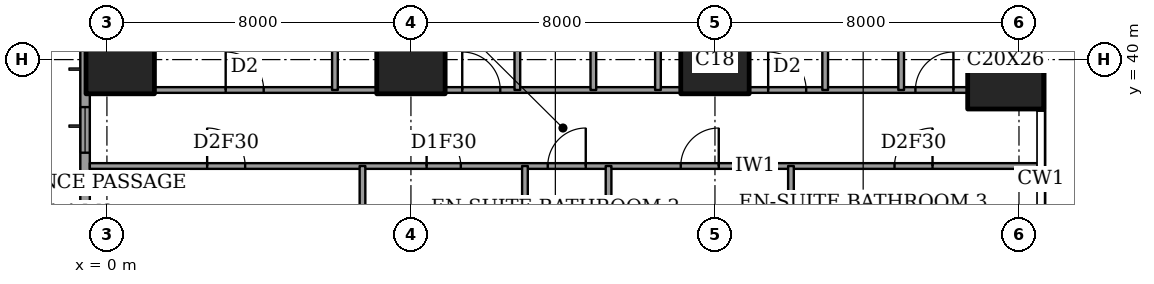
"""IFC4 building model, lengths in metres.
Left out: names, types, materials, properties, quantities, classifications, styles, units other than length and angle.
Written with IfcOpenShell. Run it as: python <this file> out.ifc"""

import sys

from ifc_helpers import new_model, si_unit, direction, frame, frame_2d, origin, origin_2d, place, context, subcontext, project, spatial, rectangle, extrude, element, fill, save


model = new_model("IFC4")
c1 = context("Model", 3, precision=1e-05, world=origin(), true_north=direction((0.0, 1.0)))
c2 = subcontext(c1, "Body", "Model", "MODEL_VIEW")
j1 = project(units=[si_unit("LENGTHUNIT", "METRE"), si_unit("PLANEANGLEUNIT", "RADIAN")], contexts=[c1])
p1 = place(None, origin())
s1 = spatial("IfcSite", under=j1, at=p1, CompositionType="ELEMENT")
p2 = place(p1, origin())
s2 = spatial("IfcBuilding", under=s1, at=p2, CompositionType="ELEMENT")
p3 = place(p2, frame((0.0, 0.0, 207.4)))
s3 = spatial("IfcBuildingStorey", under=s2, at=p3, CompositionType="ELEMENT", Elevation=207.4)
for number, where, z_axis, x_axis in (
    (1, (0.35, 40.0, 0.0), (0.0, 0.0, 1.0), (1.0, 0.0, 0.0)),
    (2, (8.0, 40.0, 0.0), (0.0, 0.0, 1.0), (1.0, 0.0, 0.0)),
    (3, (16.0, 40.0, 0.0), (0.0, 0.0, 1.0), (1.0, 0.0, 0.0)),
):
    element("IfcColumn", number, at=place(p3, frame(where, z_axis=z_axis, x_axis=x_axis)), inside=s3, PredefinedType="COLUMN", context=c2, shape_type="SweptSolid", body=[
        extrude(rectangle(XDim=1.8, YDim=1.8, at=origin_2d()), origin(), (0.0, 0.0, 1.0), 3.6),
    ])
p4 = place(p3, frame((23.65, 40.0, 0.0), z_axis=(0.0, 0.0, 1.0), x_axis=(1.0, 0.0, 0.0)))
e4 = element("IfcColumn", 4, at=p4, inside=s3, PredefinedType="COLUMN", context=c2, shape_type="SweptSolid", body=[
    extrude(rectangle(XDim=2.0, YDim=2.6, at=origin_2d()), origin(), (0.0, 0.0, 1.0), 3.6),
])
p5 = place(p3, frame((-0.575, 44.825, 0.0), z_axis=(0.0, 0.0, 1.0), x_axis=(0.0, -1.0, 0.0)))
e5 = element("IfcWall", 5, at=p5, inside=s3, PredefinedType="SOLIDWALL", context=c2, shape_type="SweptSolid", body=[
    extrude(rectangle(XDim=41.65, YDim=0.25, at=frame_2d((20.825, 0.0))), origin(), (0.0, 0.0, 1.0), 3.6),
])
p6 = place(p5, frame((0.825, 0.0, 0.2)))
e6 = element("IfcOpeningElement", 6, at=p6, cuts=e5, PredefinedType="OPENING", context=c2, shape_type="SweptSolid", body=[
    extrude(rectangle(XDim=2.4, YDim=2.4, at=frame_2d((1.2, 1.2))), frame((0.0, 0.135, 0.0), z_axis=(0.0, -1.0, 0.0), x_axis=(1.0, 0.0, 0.0)), (0.0, 0.0, 1.0), 0.27),
])
p7 = place(p5, frame((6.075, 0.0, 0.2)))
e7 = element("IfcOpeningElement", 7, at=p7, cuts=e5, PredefinedType="OPENING", context=c2, shape_type="SweptSolid", body=[
    extrude(rectangle(XDim=1.2, YDim=2.4, at=frame_2d((0.6, 1.2))), frame((0.0, 0.135, 0.0), z_axis=(0.0, -1.0, 0.0), x_axis=(1.0, 0.0, 0.0)), (0.0, 0.0, 1.0), 0.27),
])
p8 = place(p5, frame((8.575, 0.0, 0.2)))
e8 = element("IfcOpeningElement", 8, at=p8, cuts=e5, PredefinedType="OPENING", context=c2, shape_type="SweptSolid", body=[
    extrude(rectangle(XDim=2.4, YDim=2.4, at=frame_2d((1.2, 1.2))), frame((0.0, 0.135, 0.0), z_axis=(0.0, -1.0, 0.0), x_axis=(1.0, 0.0, 0.0)), (0.0, 0.0, 1.0), 0.27),
])
p9 = place(p5, frame((15.675, 0.0, 0.2)))
e9 = element("IfcOpeningElement", 9, at=p9, cuts=e5, PredefinedType="OPENING", context=c2, shape_type="SweptSolid", body=[
    extrude(rectangle(XDim=2.4, YDim=2.4, at=frame_2d((1.2, 1.2))), frame((0.0, 0.135, 0.0), z_axis=(0.0, -1.0, 0.0), x_axis=(1.0, 0.0, 0.0)), (0.0, 0.0, 1.0), 0.27),
])
p10 = place(p5, frame((23.575, 0.0, 0.2)))
e10 = element("IfcOpeningElement", 10, at=p10, cuts=e5, PredefinedType="OPENING", context=c2, shape_type="SweptSolid", body=[
    extrude(rectangle(XDim=2.4, YDim=2.4, at=frame_2d((1.2, 1.2))), frame((0.0, 0.135, 0.0), z_axis=(0.0, -1.0, 0.0), x_axis=(1.0, 0.0, 0.0)), (0.0, 0.0, 1.0), 0.27),
])
p11 = place(p5, frame((30.775, 0.0, 0.2)))
e11 = element("IfcOpeningElement", 11, at=p11, cuts=e5, PredefinedType="OPENING", context=c2, shape_type="SweptSolid", body=[
    extrude(rectangle(XDim=2.4, YDim=2.4, at=frame_2d((1.2, 1.2))), frame((0.0, 0.135, 0.0), z_axis=(0.0, -1.0, 0.0), x_axis=(1.0, 0.0, 0.0)), (0.0, 0.0, 1.0), 0.27),
])
p12 = place(p5, frame((34.55, 0.0, 0.2)))
e12 = element("IfcOpeningElement", 12, at=p12, cuts=e5, PredefinedType="OPENING", context=c2, shape_type="SweptSolid", body=[
    extrude(rectangle(XDim=1.2, YDim=2.4, at=frame_2d((0.6, 1.2))), frame((0.0, 0.135, 0.0), z_axis=(0.0, -1.0, 0.0), x_axis=(1.0, 0.0, 0.0)), (0.0, 0.0, 1.0), 0.27),
])
p13 = place(p5, frame((38.425, 0.0, 0.2)))
e13 = element("IfcOpeningElement", 13, at=p13, cuts=e5, PredefinedType="OPENING", context=c2, shape_type="SweptSolid", body=[
    extrude(rectangle(XDim=2.4, YDim=2.4, at=frame_2d((1.2, 1.2))), frame((0.0, 0.135, 0.0), z_axis=(0.0, -1.0, 0.0), x_axis=(1.0, 0.0, 0.0)), (0.0, 0.0, 1.0), 0.27),
])
p14 = place(p3, frame((-0.45, 37.2, 0.0), z_axis=(0.0, 0.0, 1.0), x_axis=(1.0, 0.0, 0.0)))
e14 = element("IfcWall", 14, at=p14, inside=s3, PredefinedType="PARTITIONING", context=c2, shape_type="SweptSolid", body=[
    extrude(rectangle(XDim=25.011, YDim=0.15, at=frame_2d((12.505, 0.0))), origin(), (0.0, 0.0, 1.0), 3.35),
])
p15 = place(p14, frame((12.05, 0.0, 0.0)))
e15 = element("IfcOpeningElement", 15, at=p15, cuts=e14, PredefinedType="OPENING", context=c2, shape_type="SweptSolid", body=[
    extrude(rectangle(XDim=1.0, YDim=2.1, at=frame_2d((0.5, 1.05))), frame((0.0, 0.085, 0.0), z_axis=(0.0, -1.0, 0.0), x_axis=(1.0, 0.0, 0.0)), (0.0, 0.0, 1.0), 0.17),
])
p16 = place(p14, frame((3.087, 0.0, 0.0)))
e16 = element("IfcOpeningElement", 16, at=p16, cuts=e14, PredefinedType="OPENING", context=c2, shape_type="SweptSolid", body=[
    extrude(rectangle(XDim=1.0, YDim=2.1, at=frame_2d((0.5, 1.05))), frame((0.0, 0.085, 0.0), z_axis=(0.0, -1.0, 0.0), x_axis=(1.0, 0.0, 0.0)), (0.0, 0.0, 1.0), 0.17),
])
p17 = place(p14, frame((8.863, 0.0, 0.0)))
e17 = element("IfcOpeningElement", 17, at=p17, cuts=e14, PredefinedType="OPENING", context=c2, shape_type="SweptSolid", body=[
    extrude(rectangle(XDim=0.9, YDim=2.1, at=frame_2d((0.45, 1.05))), frame((0.0, 0.085, 0.0), z_axis=(0.0, -1.0, 0.0), x_axis=(1.0, 0.0, 0.0)), (0.0, 0.0, 1.0), 0.17),
])
p18 = place(p14, frame((15.55, 0.0, 0.0)))
e18 = element("IfcOpeningElement", 18, at=p18, cuts=e14, PredefinedType="OPENING", context=c2, shape_type="SweptSolid", body=[
    extrude(rectangle(XDim=1.0, YDim=2.1, at=frame_2d((0.5, 1.05))), frame((0.0, 0.085, 0.0), z_axis=(0.0, -1.0, 0.0), x_axis=(1.0, 0.0, 0.0)), (0.0, 0.0, 1.0), 0.17),
])
p19 = place(p14, frame((21.175, 0.0, 0.0)))
e19 = element("IfcOpeningElement", 19, at=p19, cuts=e14, PredefinedType="OPENING", context=c2, shape_type="SweptSolid", body=[
    extrude(rectangle(XDim=1.0, YDim=2.1, at=frame_2d((0.5, 1.05))), frame((0.0, 0.085, 0.0), z_axis=(0.0, -1.0, 0.0), x_axis=(1.0, 0.0, 0.0)), (0.0, 0.0, 1.0), 0.17),
])
p20 = place(p3, frame((1.25, 39.2, 0.0), z_axis=(0.0, 0.0, 1.0), x_axis=(1.0, 0.0, 0.0)))
e20 = element("IfcWall", 20, at=p20, inside=s3, PredefinedType="PARTITIONING", context=c2, shape_type="SweptSolid", body=[
    extrude(rectangle(XDim=5.85, YDim=0.15, at=frame_2d((2.925, 0.0))), origin(), (0.0, 0.0, 1.0), 3.35),
])
p21 = place(p20, frame((1.875, 0.0, 0.0)))
e21 = element("IfcOpeningElement", 21, at=p21, cuts=e20, PredefinedType="OPENING", context=c2, shape_type="SweptSolid", body=[
    extrude(rectangle(XDim=1.0, YDim=2.1, at=frame_2d((0.5, 1.05))), frame((0.0, 0.085, 0.0), z_axis=(0.0, -1.0, 0.0), x_axis=(1.0, 0.0, 0.0)), (0.0, 0.0, 1.0), 0.17),
])
p22 = place(p3, frame((8.9, 39.2, 0.0), z_axis=(0.0, 0.0, 1.0), x_axis=(1.0, 0.0, 0.0)))
e22 = element("IfcWall", 22, at=p22, inside=s3, PredefinedType="PARTITIONING", context=c2, shape_type="SweptSolid", body=[
    extrude(rectangle(XDim=6.2, YDim=0.15, at=frame_2d((3.1, 0.0))), origin(), (0.0, 0.0, 1.0), 3.35),
])
p23 = place(p22, frame((0.45, 0.0, 0.0)))
e23 = element("IfcOpeningElement", 23, at=p23, cuts=e22, PredefinedType="OPENING", context=c2, shape_type="SweptSolid", body=[
    extrude(rectangle(XDim=1.0, YDim=2.1, at=frame_2d((0.5, 1.05))), frame((0.0, 0.085, 0.0), z_axis=(0.0, -1.0, 0.0), x_axis=(1.0, 0.0, 0.0)), (0.0, 0.0, 1.0), 0.17),
])
p24 = place(p3, frame((16.9, 39.2, 0.0), z_axis=(0.0, 0.0, 1.0), x_axis=(1.0, 0.0, 0.0)))
e24 = element("IfcWall", 24, at=p24, inside=s3, PredefinedType="PARTITIONING", context=c2, shape_type="SweptSolid", body=[
    extrude(rectangle(XDim=5.75, YDim=0.15, at=frame_2d((2.875, 0.0))), origin(), (0.0, 0.0, 1.0), 3.35),
])
p25 = place(p24, frame((0.5, 0.0, 0.0)))
e25 = element("IfcOpeningElement", 25, at=p25, cuts=e24, PredefinedType="OPENING", context=c2, shape_type="SweptSolid", body=[
    extrude(rectangle(XDim=1.0, YDim=2.1, at=frame_2d((0.5, 1.05))), frame((0.0, 0.085, 0.0), z_axis=(0.0, -1.0, 0.0), x_axis=(1.0, 0.0, 0.0)), (0.0, 0.0, 1.0), 0.17),
])
p26 = place(p24, frame((4.375, 0.0, 0.0)))
e26 = element("IfcOpeningElement", 26, at=p26, cuts=e24, PredefinedType="OPENING", context=c2, shape_type="SweptSolid", body=[
    extrude(rectangle(XDim=1.0, YDim=2.1, at=frame_2d((0.5, 1.05))), frame((0.0, 0.085, 0.0), z_axis=(0.0, -1.0, 0.0), x_axis=(1.0, 0.0, 0.0)), (0.0, 0.0, 1.0), 0.17),
])
p27 = place(p3, frame((6.0, 39.2, 0.0), z_axis=(0.0, 0.0, 1.0), x_axis=(0.0, 1.0, 0.0)))
e27 = element("IfcWall", 27, at=p27, inside=s3, PredefinedType="PARTITIONING", context=c2, shape_type="SweptSolid", body=[
    extrude(rectangle(XDim=9.25, YDim=0.15, at=frame_2d((4.625, 0.0))), origin(), (0.0, 0.0, 1.0), 3.35),
])
p28 = place(p3, frame((6.725, 33.2, 0.0), z_axis=(0.0, 0.0, 1.0), x_axis=(0.0, 1.0, 0.0)))
e28 = element("IfcWall", 28, at=p28, inside=s3, PredefinedType="PARTITIONING", context=c2, shape_type="SweptSolid", body=[
    extrude(rectangle(XDim=4.0, YDim=0.15, at=frame_2d((2.0, 0.0))), origin(), (0.0, 0.0, 1.0), 3.35),
])
p29 = place(p3, frame((10.8, 39.2, 0.0), z_axis=(0.0, 0.0, 1.0), x_axis=(0.0, 1.0, 0.0)))
e29 = element("IfcWall", 29, at=p29, inside=s3, PredefinedType="PARTITIONING", context=c2, shape_type="SweptSolid", body=[
    extrude(rectangle(XDim=3.4, YDim=0.15, at=frame_2d((1.7, 0.0))), origin(), (0.0, 0.0, 1.0), 3.35),
])
p30 = place(p29, frame((1.25, 0.0, 0.0)))
e30 = element("IfcOpeningElement", 30, at=p30, cuts=e29, PredefinedType="OPENING", context=c2, shape_type="SweptSolid", body=[
    extrude(rectangle(XDim=0.9, YDim=2.1, at=frame_2d((0.45, 1.05))), frame((0.0, 0.085, 0.0), z_axis=(0.0, -1.0, 0.0), x_axis=(1.0, 0.0, 0.0)), (0.0, 0.0, 1.0), 0.17),
])
p31 = place(p3, frame((11.0, 28.0, 0.0), z_axis=(0.0, 0.0, 1.0), x_axis=(0.0, 1.0, 0.0)))
e31 = element("IfcWall", 31, at=p31, inside=s3, PredefinedType="PARTITIONING", context=c2, shape_type="SweptSolid", body=[
    extrude(rectangle(XDim=9.2, YDim=0.15, at=frame_2d((4.6, 0.0))), origin(), (0.0, 0.0, 1.0), 3.35),
])
p32 = place(p31, frame((0.837, 0.0, 0.0)))
e32 = element("IfcOpeningElement", 32, at=p32, cuts=e31, PredefinedType="OPENING", context=c2, shape_type="SweptSolid", body=[
    extrude(rectangle(XDim=1.0, YDim=2.1, at=frame_2d((0.5, 1.05))), frame((0.0, 0.085, 0.0), z_axis=(0.0, -1.0, 0.0), x_axis=(1.0, 0.0, 0.0)), (0.0, 0.0, 1.0), 0.17),
])
p33 = place(p3, frame((12.8, 39.2, 0.0), z_axis=(0.0, 0.0, 1.0), x_axis=(0.0, 1.0, 0.0)))
e33 = element("IfcWall", 33, at=p33, inside=s3, PredefinedType="PARTITIONING", context=c2, shape_type="SweptSolid", body=[
    extrude(rectangle(XDim=9.25, YDim=0.15, at=frame_2d((4.625, 0.0))), origin(), (0.0, 0.0, 1.0), 3.35),
])
p34 = place(p33, frame((5.875, 0.0, 0.0)))
e34 = element("IfcOpeningElement", 34, at=p34, cuts=e33, PredefinedType="OPENING", context=c2, shape_type="SweptSolid", body=[
    extrude(rectangle(XDim=0.9, YDim=2.1, at=frame_2d((0.45, 1.05))), frame((0.0, 0.085, 0.0), z_axis=(0.0, -1.0, 0.0), x_axis=(1.0, 0.0, 0.0)), (0.0, 0.0, 1.0), 0.17),
])
p35 = place(p3, frame((13.2, 30.675, 0.0), z_axis=(0.0, 0.0, 1.0), x_axis=(0.0, 1.0, 0.0)))
e35 = element("IfcWall", 35, at=p35, inside=s3, PredefinedType="PARTITIONING", context=c2, shape_type="SweptSolid", body=[
    extrude(rectangle(XDim=6.525, YDim=0.15, at=frame_2d((3.262, 0.0))), origin(), (0.0, 0.0, 1.0), 3.35),
])
p36 = place(p3, frame((14.5, 39.2, 0.0), z_axis=(0.0, 0.0, 1.0), x_axis=(0.0, 1.0, 0.0)))
e36 = element("IfcWall", 36, at=p36, inside=s3, PredefinedType="PARTITIONING", context=c2, shape_type="SweptSolid", body=[
    extrude(rectangle(XDim=9.25, YDim=0.15, at=frame_2d((4.625, 0.0))), origin(), (0.0, 0.0, 1.0), 3.35),
])
p37 = place(p3, frame((18.0, 28.0, 0.0), z_axis=(0.0, 0.0, 1.0), x_axis=(0.0, 1.0, 0.0)))
e37 = element("IfcWall", 37, at=p37, inside=s3, PredefinedType="PARTITIONING", context=c2, shape_type="SweptSolid", body=[
    extrude(rectangle(XDim=9.2, YDim=0.15, at=frame_2d((4.6, 0.0))), origin(), (0.0, 0.0, 1.0), 3.35),
])
p38 = place(p37, frame((0.837, 0.0, 0.0)))
e38 = element("IfcOpeningElement", 38, at=p38, cuts=e37, PredefinedType="OPENING", context=c2, shape_type="SweptSolid", body=[
    extrude(rectangle(XDim=1.0, YDim=2.1, at=frame_2d((0.5, 1.05))), frame((0.0, 0.085, 0.0), z_axis=(0.0, -1.0, 0.0), x_axis=(1.0, 0.0, 0.0)), (0.0, 0.0, 1.0), 0.17),
])
p39 = place(p3, frame((18.9, 39.2, 0.0), z_axis=(0.0, 0.0, 1.0), x_axis=(0.0, 1.0, 0.0)))
e39 = element("IfcWall", 39, at=p39, inside=s3, PredefinedType="PARTITIONING", context=c2, shape_type="SweptSolid", body=[
    extrude(rectangle(XDim=3.7, YDim=0.15, at=frame_2d((1.85, 0.0))), origin(), (0.0, 0.0, 1.0), 3.35),
])
p40 = place(p39, frame((1.4, 0.0, 0.0)))
e40 = element("IfcOpeningElement", 40, at=p40, cuts=e39, PredefinedType="OPENING", context=c2, shape_type="SweptSolid", body=[
    extrude(rectangle(XDim=0.9, YDim=2.1, at=frame_2d((0.45, 1.05))), frame((0.0, 0.085, 0.0), z_axis=(0.0, -1.0, 0.0), x_axis=(1.0, 0.0, 0.0)), (0.0, 0.0, 1.0), 0.17),
])
p41 = place(p3, frame((20.9, 39.2, 0.0), z_axis=(0.0, 0.0, 1.0), x_axis=(0.0, 1.0, 0.0)))
e41 = element("IfcWall", 41, at=p41, inside=s3, PredefinedType="PARTITIONING", context=c2, shape_type="SweptSolid", body=[
    extrude(rectangle(XDim=9.25, YDim=0.15, at=frame_2d((4.625, 0.0))), origin(), (0.0, 0.0, 1.0), 3.35),
])
p42 = place(p7, origin())
e42 = element("IfcWindow", 42, at=p42, inside=s3, PartitioningType="SINGLE_PANEL", PredefinedType="WINDOW", context=c2, shape_type="SweptSolid", body=[
    extrude(rectangle(XDim=1.2, YDim=2.4, at=frame_2d((0.6, 1.2))), frame((0.0, 0.03, 0.0), z_axis=(0.0, -1.0, 0.0), x_axis=(1.0, 0.0, 0.0)), (0.0, 0.0, 1.0), 0.06),
])
fill(e7, e42)
p43 = place(p8, origin())
e43 = element("IfcWindow", 43, at=p43, inside=s3, PartitioningType="SINGLE_PANEL", PredefinedType="WINDOW", context=c2, shape_type="SweptSolid", body=[
    extrude(rectangle(XDim=2.4, YDim=2.4, at=frame_2d((1.2, 1.2))), frame((0.0, 0.03, 0.0), z_axis=(0.0, -1.0, 0.0), x_axis=(1.0, 0.0, 0.0)), (0.0, 0.0, 1.0), 0.06),
])
fill(e8, e43)
p44 = place(p21, origin())
e44 = element("IfcDoor", 44, at=p44, inside=s3, OperationType="SINGLE_SWING_RIGHT", PredefinedType="DOOR", context=c2, shape_type="SweptSolid", body=[
    extrude(rectangle(XDim=1.0, YDim=2.1, at=frame_2d((0.5, 1.05))), frame((0.0, 0.025, 0.0), z_axis=(0.0, -1.0, 0.0), x_axis=(1.0, 0.0, 0.0)), (0.0, 0.0, 1.0), 0.05),
])
fill(e21, e44)
p45 = place(p23, origin())
e45 = element("IfcDoor", 45, at=p45, inside=s3, OperationType="SINGLE_SWING_RIGHT", PredefinedType="DOOR", context=c2, shape_type="SweptSolid", body=[
    extrude(rectangle(XDim=1.0, YDim=2.1, at=frame_2d((0.5, 1.05))), frame((0.0, 0.025, 0.0), z_axis=(0.0, -1.0, 0.0), x_axis=(1.0, 0.0, 0.0)), (0.0, 0.0, 1.0), 0.05),
])
fill(e23, e45)
p46 = place(p25, origin())
e46 = element("IfcDoor", 46, at=p46, inside=s3, OperationType="SINGLE_SWING_RIGHT", PredefinedType="DOOR", context=c2, shape_type="SweptSolid", body=[
    extrude(rectangle(XDim=1.0, YDim=2.1, at=frame_2d((0.5, 1.05))), frame((0.0, 0.025, 0.0), z_axis=(0.0, -1.0, 0.0), x_axis=(1.0, 0.0, 0.0)), (0.0, 0.0, 1.0), 0.05),
])
fill(e25, e46)
p47 = place(p26, origin())
e47 = element("IfcDoor", 47, at=p47, inside=s3, OperationType="SINGLE_SWING_LEFT", PredefinedType="DOOR", context=c2, shape_type="SweptSolid", body=[
    extrude(rectangle(XDim=1.0, YDim=2.1, at=frame_2d((0.5, 1.05))), frame((0.0, 0.025, 0.0), z_axis=(0.0, -1.0, 0.0), x_axis=(1.0, 0.0, 0.0)), (0.0, 0.0, 1.0), 0.05),
])
fill(e26, e47)
p48 = place(p15, origin())
e48 = element("IfcDoor", 48, at=p48, inside=s3, OperationType="SINGLE_SWING_LEFT", PredefinedType="DOOR", context=c2, shape_type="SweptSolid", body=[
    extrude(rectangle(XDim=1.0, YDim=2.1, at=frame_2d((0.5, 1.05))), frame((0.0, 0.025, 0.0), z_axis=(0.0, -1.0, 0.0), x_axis=(1.0, 0.0, 0.0)), (0.0, 0.0, 1.0), 0.05),
])
fill(e15, e48)
p49 = place(p16, origin())
e49 = element("IfcDoor", 49, at=p49, inside=s3, OperationType="SINGLE_SWING_RIGHT", PredefinedType="DOOR", context=c2, shape_type="SweptSolid", body=[
    extrude(rectangle(XDim=1.0, YDim=2.1, at=frame_2d((0.5, 1.05))), frame((0.0, 0.025, 0.0), z_axis=(0.0, -1.0, 0.0), x_axis=(1.0, 0.0, 0.0)), (0.0, 0.0, 1.0), 0.05),
])
fill(e16, e49)
p50 = place(p17, origin())
e50 = element("IfcDoor", 50, at=p50, inside=s3, OperationType="SINGLE_SWING_RIGHT", PredefinedType="DOOR", context=c2, shape_type="SweptSolid", body=[
    extrude(rectangle(XDim=0.9, YDim=2.1, at=frame_2d((0.45, 1.05))), frame((0.0, 0.025, 0.0), z_axis=(0.0, -1.0, 0.0), x_axis=(1.0, 0.0, 0.0)), (0.0, 0.0, 1.0), 0.05),
])
fill(e17, e50)
p51 = place(p18, origin())
e51 = element("IfcDoor", 51, at=p51, inside=s3, OperationType="SINGLE_SWING_LEFT", PredefinedType="DOOR", context=c2, shape_type="SweptSolid", body=[
    extrude(rectangle(XDim=1.0, YDim=2.1, at=frame_2d((0.5, 1.05))), frame((0.0, 0.025, 0.0), z_axis=(0.0, -1.0, 0.0), x_axis=(1.0, 0.0, 0.0)), (0.0, 0.0, 1.0), 0.05),
])
fill(e18, e51)
p52 = place(p19, origin())
e52 = element("IfcDoor", 52, at=p52, inside=s3, OperationType="SINGLE_SWING_LEFT", PredefinedType="DOOR", context=c2, shape_type="SweptSolid", body=[
    extrude(rectangle(XDim=1.0, YDim=2.1, at=frame_2d((0.5, 1.05))), frame((0.0, 0.025, 0.0), z_axis=(0.0, -1.0, 0.0), x_axis=(1.0, 0.0, 0.0)), (0.0, 0.0, 1.0), 0.05),
])
fill(e19, e52)
save(model, sys.argv[1])
